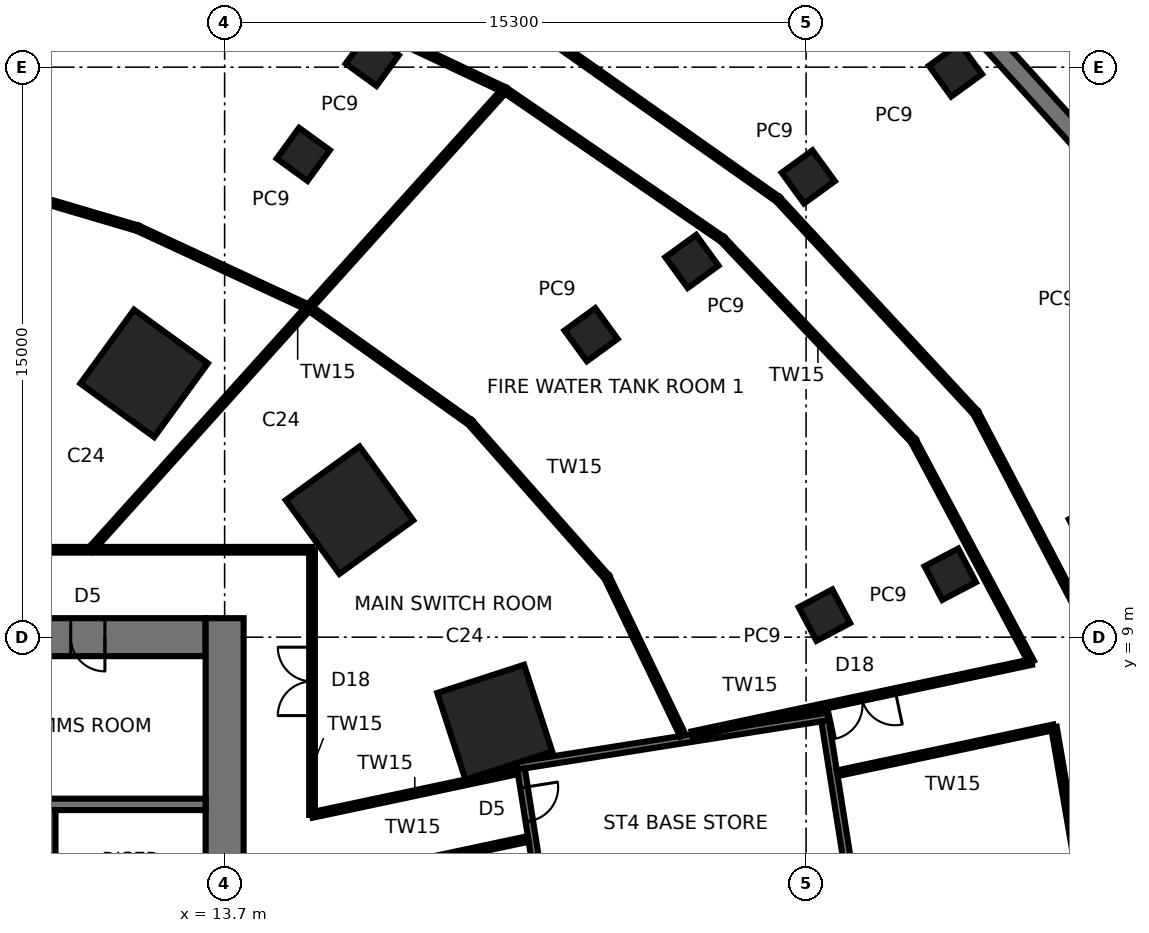
"""IFC4 building model, lengths in metres.
Left out: names, types, materials, properties, quantities, classifications, styles, units other than length and angle.
Written with IfcOpenShell. Run it as: python <this file> out.ifc"""

import sys

from ifc_helpers import new_model, si_unit, direction, frame, frame_2d, origin, origin_2d, place, context, subcontext, project, spatial, rectangle, extrude, element, fill, save


model = new_model("IFC4")
c1 = context("Model", 3, precision=1e-05, world=origin(), true_north=direction((0.0, 1.0)))
c2 = subcontext(c1, "Body", "Model", "MODEL_VIEW")
j1 = project(units=[si_unit("LENGTHUNIT", "METRE"), si_unit("PLANEANGLEUNIT", "RADIAN")], contexts=[c1])
p1 = place(None, origin())
s1 = spatial("IfcSite", under=j1, at=p1, CompositionType="ELEMENT")
p2 = place(p1, origin())
s2 = spatial("IfcBuilding", under=s1, at=p2, CompositionType="ELEMENT")
p3 = place(p2, frame((0.0, 0.0, -5.0)))
s3 = spatial("IfcBuildingStorey", under=s2, at=p3, CompositionType="ELEMENT", Elevation=-5.0)
p4 = place(p3, frame((40.052, 17.832, -0.15), z_axis=(0.0, 0.0, 1.0), x_axis=(-0.670913323969, 0.741535779124, 0.0)))
e1 = element("IfcWall", 1, at=p4, inside=s3, PredefinedType="SOLIDWALL", context=c2, shape_type="SweptSolid", body=[
    extrude(rectangle(XDim=9.168, YDim=0.5, at=frame_2d((4.584, 0.0))), origin(), (0.0, 0.0, 1.0), 4.95),
])
for number, where, z_axis, x_axis in (
    (2, (20.808, 6.761, -0.15), (0.0, 0.0, 1.0), (0.951, 0.309, 0.0)),
    (3, (16.986, 12.341, -0.15), (0.0, 0.0, 1.0), (0.809, 0.588, 0.0)),
    (4, (11.581, 15.94, -0.15), (0.0, 0.0, 1.0), (0.588, 0.809, 0.0)),
):
    element("IfcColumn", number, at=place(p3, frame(where, z_axis=z_axis, x_axis=x_axis)), inside=s3, PredefinedType="COLUMN", context=c2, shape_type="SweptSolid", body=[
        extrude(rectangle(XDim=2.4, YDim=2.4, at=origin_2d()), origin(), (0.0, 0.0, 1.0), 5.15),
    ])
for number, where, z_axis, x_axis in (
    (5, (32.93, 23.925, -0.15), (0.0, 0.0, 1.0), (0.809, 0.588, 0.0)),
    (6, (36.589, 11.888, -0.15), (0.0, 0.0, 1.0), (0.887, 0.461, 0.0)),
    (7, (29.057, 21.111, -0.15), (0.0, 0.0, 1.0), (0.809, 0.588, 0.0)),
    (8, (32.794, 10.655, -0.15), (0.0, 0.0, 1.0), (0.885, 0.465, 0.0)),
    (9, (25.997, 18.888, -0.15), (0.0, 0.0, 1.0), (0.809, 0.588, 0.0)),
    (10, (17.585, 24.204, -0.15), (0.0, 0.0, 1.0), (0.588, 0.809, 0.0)),
    (11, (29.482, 9.579, -0.15), (0.0, 0.0, 1.0), (0.884, 0.467, 0.0)),
    (12, (23.342, 16.959, -0.15), (0.0, 0.0, 1.0), (0.809, 0.588, 0.0)),
    (13, (15.77, 21.705, -0.15), (0.0, 0.0, 1.0), (0.588, 0.809, 0.0)),
):
    element("IfcColumn", number, at=place(p3, frame(where, z_axis=z_axis, x_axis=x_axis)), inside=s3, PredefinedType="COLUMN", context=c2, shape_type="SweptSolid", body=[
        extrude(rectangle(XDim=1.0, YDim=1.0, at=origin_2d()), origin(), (0.0, 0.0, 1.0), 5.15),
    ])
p5 = place(p3, frame((13.2, 9.0, -0.15), z_axis=(0.0, 0.0, 1.0), x_axis=(-1.0, 0.0, 0.0)))
e14 = element("IfcWall", 14, at=p5, inside=s3, PredefinedType="SHEAR", context=c2, shape_type="SweptSolid", body=[
    extrude(rectangle(XDim=26.4, YDim=1.0, at=frame_2d((13.2, 0.0))), origin(), (0.0, 0.0, 1.0), 5.15),
])
p6 = place(p5, frame((2.65, 0.0, 0.15)))
e15 = element("IfcOpeningElement", 15, at=p6, cuts=e14, PredefinedType="OPENING", context=c2, shape_type="SweptSolid", body=[
    extrude(rectangle(XDim=0.9, YDim=2.1, at=frame_2d((0.45, 1.05))), frame((0.0, 0.51, 0.0), z_axis=(0.0, -1.0, 0.0), x_axis=(1.0, 0.0, 0.0)), (0.0, 0.0, 1.0), 1.02),
])
p7 = place(p5, frame((9.5, 0.0, 0.15)))
e16 = element("IfcOpeningElement", 16, at=p7, cuts=e14, PredefinedType="OPENING", context=c2, shape_type="SweptSolid", body=[
    extrude(rectangle(XDim=0.9, YDim=2.1, at=frame_2d((0.45, 1.05))), frame((0.0, 0.51, 0.0), z_axis=(0.0, -1.0, 0.0), x_axis=(1.0, 0.0, 0.0)), (0.0, 0.0, 1.0), 1.02),
])
p8 = place(p5, frame((16.0, 0.0, 0.15)))
e17 = element("IfcOpeningElement", 17, at=p8, cuts=e14, PredefinedType="OPENING", context=c2, shape_type="SweptSolid", body=[
    extrude(rectangle(XDim=0.9, YDim=2.1, at=frame_2d((0.45, 1.05))), frame((0.0, 0.51, 0.0), z_axis=(0.0, -1.0, 0.0), x_axis=(1.0, 0.0, 0.0)), (0.0, 0.0, 1.0), 1.02),
])
p9 = place(p5, frame((21.25, 0.0, 0.15)))
e18 = element("IfcOpeningElement", 18, at=p9, cuts=e14, PredefinedType="OPENING", context=c2, shape_type="SweptSolid", body=[
    extrude(rectangle(XDim=0.9, YDim=2.1, at=frame_2d((0.45, 1.05))), frame((0.0, 0.51, 0.0), z_axis=(0.0, -1.0, 0.0), x_axis=(1.0, 0.0, 0.0)), (0.0, 0.0, 1.0), 1.02),
])
p10 = place(p5, frame((24.8, 0.0, 0.15)))
e19 = element("IfcOpeningElement", 19, at=p10, cuts=e14, PredefinedType="OPENING", context=c2, shape_type="SweptSolid", body=[
    extrude(rectangle(XDim=1.0, YDim=2.1, at=frame_2d((0.5, 1.05))), frame((0.0, 0.51, 0.0), z_axis=(0.0, -1.0, 0.0), x_axis=(1.0, 0.0, 0.0)), (0.0, 0.0, 1.0), 1.02),
])
p11 = place(p3, frame((13.7, -9.5, -0.15), z_axis=(0.0, 0.0, 1.0), x_axis=(0.0, 1.0, 0.0)))
e20 = element("IfcWall", 20, at=p11, inside=s3, PredefinedType="SHEAR", context=c2, shape_type="SweptSolid", body=[
    extrude(rectangle(XDim=19.0, YDim=1.0, at=frame_2d((9.5, 0.0))), origin(), (0.0, 0.0, 1.0), 5.15),
])
p12 = place(p11, frame((8.6, 0.0, 0.15)))
e21 = element("IfcOpeningElement", 21, at=p12, cuts=e20, PredefinedType="OPENING", context=c2, shape_type="SweptSolid", body=[
    extrude(rectangle(XDim=1.8, YDim=2.4, at=frame_2d((0.9, 1.2))), frame((0.0, 0.51, 0.0), z_axis=(0.0, -1.0, 0.0), x_axis=(1.0, 0.0, 0.0)), (0.0, 0.0, 1.0), 1.02),
])
p13 = place(p3, frame((-13.2, 4.6, -0.15), z_axis=(0.0, 0.0, 1.0), x_axis=(1.0, 0.0, 0.0)))
e22 = element("IfcWall", 22, at=p13, inside=s3, PredefinedType="SHEAR", context=c2, shape_type="SweptSolid", body=[
    extrude(rectangle(XDim=26.4, YDim=0.3, at=frame_2d((13.2, 0.0))), origin(), (0.0, 0.0, 1.0), 5.15),
])
p14 = place(p3, frame((9.1, 1.75, -0.15), z_axis=(0.0, 0.0, 1.0), x_axis=(0.0, 1.0, 0.0)))
e23 = element("IfcWall", 23, at=p14, inside=s3, PredefinedType="SHEAR", context=c2, shape_type="SweptSolid", body=[
    extrude(rectangle(XDim=2.7, YDim=0.3, at=frame_2d((1.35, 0.0))), origin(), (0.0, 0.0, 1.0), 5.15),
])
p15 = place(p3, frame((21.385, 5.615, 0.0), z_axis=(0.0, 0.0, 1.0), x_axis=(0.987689398324, 0.156427786655, 0.0)))
e24 = element("IfcWall", 24, at=p15, inside=s3, PredefinedType="SOLIDWALL", context=c2, shape_type="SweptSolid", body=[
    extrude(rectangle(XDim=8.3, YDim=0.2, at=frame_2d((4.15, 0.0))), origin(), (0.0, 0.0, 1.0), 4.8),
])
p16 = place(p3, frame((22.156, 1.383, 0.0), z_axis=(0.0, 0.0, 1.0), x_axis=(-0.156428225752, 0.987689328781, 0.0)))
e25 = element("IfcWall", 25, at=p16, inside=s3, PredefinedType="SOLIDWALL", context=c2, shape_type="SweptSolid", body=[
    extrude(rectangle(XDim=4.2, YDim=0.2, at=frame_2d((2.1, 0.0))), origin(), (0.0, 0.0, 1.0), 4.8),
])
p17 = place(p16, frame((2.81, 0.0, 0.0)))
e26 = element("IfcOpeningElement", 26, at=p17, cuts=e25, PredefinedType="OPENING", context=c2, shape_type="SweptSolid", body=[
    extrude(rectangle(XDim=0.9, YDim=2.1, at=frame_2d((0.45, 1.05))), frame((0.0, 0.11, 0.0), z_axis=(0.0, -1.0, 0.0), x_axis=(1.0, 0.0, 0.0)), (0.0, 0.0, 1.0), 0.22),
])
p18 = place(p3, frame((30.157, 2.65, 0.0), z_axis=(0.0, 0.0, 1.0), x_axis=(-0.156419245009, 0.987690751091, 0.0)))
e27 = element("IfcWall", 27, at=p18, inside=s3, PredefinedType="SOLIDWALL", context=c2, shape_type="SweptSolid", body=[
    extrude(rectangle(XDim=4.2, YDim=0.2, at=frame_2d((2.1, 0.0))), origin(), (0.0, 0.0, 1.0), 4.8),
])
p19 = place(p3, frame((35.521, 6.63, 0.0), z_axis=(0.0, 0.0, 1.0), x_axis=(0.16926398277, -0.985570750447, 0.0)))
e28 = element("IfcWall", 28, at=p19, inside=s3, PredefinedType="PARTITIONING", context=c2, shape_type="SweptSolid", body=[
    extrude(rectangle(XDim=6.727, YDim=0.15, at=frame_2d((3.364, 0.0))), origin(), (0.0, 0.0, 1.0), 4.8),
])
p20 = place(p3, frame((16.0, 2.481, 0.0), z_axis=(0.0, 0.0, 1.0), x_axis=(0.978144448143, 0.207926522038, 0.0)))
e29 = element("IfcWall", 29, at=p20, inside=s3, PredefinedType="PARTITIONING", context=c2, shape_type="SweptSolid", body=[
    extrude(rectangle(XDim=5.817, YDim=0.15, at=frame_2d((2.908, 0.0))), origin(), (0.0, 0.0, 1.0), 4.8),
])
p21 = place(p3, frame((29.82, 5.418, 0.0), z_axis=(0.0, 0.0, 1.0), x_axis=(0.97814799205, 0.207909849813, 0.0)))
e30 = element("IfcWall", 30, at=p21, inside=s3, PredefinedType="PARTITIONING", context=c2, shape_type="SweptSolid", body=[
    extrude(rectangle(XDim=5.829, YDim=0.15, at=frame_2d((2.915, 0.0))), origin(), (0.0, 0.0, 1.0), 4.8),
])
p22 = place(p3, frame((34.928, 8.344, 0.0), z_axis=(0.0, 0.0, 1.0), x_axis=(-0.978145998804, -0.207919227161, 0.0)))
e31 = element("IfcWall", 31, at=p22, inside=s3, PredefinedType="PARTITIONING", context=c2, shape_type="SweptSolid", body=[
    extrude(rectangle(XDim=9.126, YDim=0.15, at=frame_2d((4.563, 0.0))), origin(), (0.0, 0.0, 1.0), 4.8),
])
p23 = place(p22, frame((3.663, 0.0, 0.0)))
e32 = element("IfcOpeningElement", 32, at=p23, cuts=e31, PredefinedType="OPENING", context=c2, shape_type="SweptSolid", body=[
    extrude(rectangle(XDim=1.8, YDim=2.4, at=frame_2d((0.9, 1.2))), frame((0.0, 0.085, 0.0), z_axis=(0.0, -1.0, 0.0), x_axis=(1.0, 0.0, 0.0)), (0.0, 0.0, 1.0), 0.17),
])
p24 = place(p3, frame((21.408, 5.47, 0.0), z_axis=(0.0, 0.0, 1.0), x_axis=(-0.978148748832, -0.207906289368, 0.0)))
e33 = element("IfcWall", 33, at=p24, inside=s3, PredefinedType="PARTITIONING", context=c2, shape_type="SweptSolid", body=[
    extrude(rectangle(XDim=5.529, YDim=0.15, at=frame_2d((2.764, 0.0))), origin(), (0.0, 0.0, 1.0), 4.8),
])
p25 = place(p3, frame((37.129, 7.892, 0.0), z_axis=(0.0, 0.0, 1.0), x_axis=(-0.462902565911, 0.886409168766, 0.0)))
e34 = element("IfcWall", 34, at=p25, inside=s3, PredefinedType="PARTITIONING", context=c2, shape_type="SweptSolid", body=[
    extrude(rectangle(XDim=7.907, YDim=0.15, at=frame_2d((3.954, 0.0))), origin(), (0.0, 0.0, 1.0), 4.8),
])
p26 = place(p3, frame((31.825, 14.169, 0.0), z_axis=(0.0, 0.0, 1.0), x_axis=(0.470234923121, -0.882541283497, 0.0)))
e35 = element("IfcWall", 35, at=p26, inside=s3, PredefinedType="PARTITIONING", context=c2, shape_type="SweptSolid", body=[
    extrude(rectangle(XDim=6.6, YDim=0.15, at=frame_2d((3.3, 0.0))), origin(), (0.0, 0.0, 1.0), 4.8),
])
p27 = place(p3, frame((23.76, 10.579, 0.0), z_axis=(0.0, 0.0, 1.0), x_axis=(0.432478788048, -0.90164410822, 0.0)))
e36 = element("IfcWall", 36, at=p27, inside=s3, PredefinedType="PARTITIONING", context=c2, shape_type="SweptSolid", body=[
    extrude(rectangle(XDim=4.625, YDim=0.15, at=frame_2d((2.312, 0.0))), origin(), (0.0, 0.0, 1.0), 4.8),
])
p28 = place(p3, frame((16.0, 4.321, 0.0), z_axis=(0.0, 0.0, 1.0), x_axis=(0.0, 1.0, 0.0)))
e37 = element("IfcWall", 37, at=p28, inside=s3, PredefinedType="PARTITIONING", context=c2, shape_type="SweptSolid", body=[
    extrude(rectangle(XDim=6.979, YDim=0.15, at=frame_2d((3.49, 0.0))), origin(), (0.0, 0.0, 1.0), 4.8),
])
p29 = place(p28, frame((2.615, 0.0, 0.0)))
e38 = element("IfcOpeningElement", 38, at=p29, cuts=e37, PredefinedType="OPENING", context=c2, shape_type="SweptSolid", body=[
    extrude(rectangle(XDim=1.8, YDim=2.4, at=frame_2d((0.9, 1.2))), frame((0.0, 0.085, 0.0), z_axis=(0.0, -1.0, 0.0), x_axis=(1.0, 0.0, 0.0)), (0.0, 0.0, 1.0), 0.17),
])
p30 = place(p3, frame((26.799, 19.47, 0.0), z_axis=(0.0, 0.0, 1.0), x_axis=(0.688006019466, -0.725704979436, 0.0)))
e39 = element("IfcWall", 39, at=p30, inside=s3, PredefinedType="PARTITIONING", context=c2, shape_type="SweptSolid", body=[
    extrude(rectangle(XDim=7.305, YDim=0.15, at=frame_2d((3.652, 0.0))), origin(), (0.0, 0.0, 1.0), 4.8),
])
p31 = place(p3, frame((33.469, 14.901, 0.0), z_axis=(0.0, 0.0, 1.0), x_axis=(-0.679653590843, 0.733533227914, 0.0)))
e40 = element("IfcWall", 40, at=p31, inside=s3, PredefinedType="PARTITIONING", context=c2, shape_type="SweptSolid", body=[
    extrude(rectangle(XDim=7.671, YDim=0.15, at=frame_2d((3.836, 0.0))), origin(), (0.0, 0.0, 1.0), 4.8),
])
p32 = place(p3, frame((20.164, 14.65, 0.0), z_axis=(0.0, 0.0, 1.0), x_axis=(0.661972392396, -0.749528219419, 0.0)))
e41 = element("IfcWall", 41, at=p32, inside=s3, PredefinedType="PARTITIONING", context=c2, shape_type="SweptSolid", body=[
    extrude(rectangle(XDim=5.432, YDim=0.15, at=frame_2d((2.716, 0.0))), origin(), (0.0, 0.0, 1.0), 4.8),
])
p33 = place(p3, frame((21.07, 23.401, 0.0), z_axis=(0.0, 0.0, 1.0), x_axis=(0.824602390989, -0.565712733439, 0.0)))
e42 = element("IfcWall", 42, at=p33, inside=s3, PredefinedType="PARTITIONING", context=c2, shape_type="SweptSolid", body=[
    extrude(rectangle(XDim=6.947, YDim=0.15, at=frame_2d((3.474, 0.0))), origin(), (0.0, 0.0, 1.0), 4.8),
])
p34 = place(p3, frame((28.255, 20.529, 0.0), z_axis=(0.0, 0.0, 1.0), x_axis=(-0.817737752459, 0.575590973003, 0.0)))
e43 = element("IfcWall", 43, at=p34, inside=s3, PredefinedType="PARTITIONING", context=c2, shape_type="SweptSolid", body=[
    extrude(rectangle(XDim=7.314, YDim=0.15, at=frame_2d((3.657, 0.0))), origin(), (0.0, 0.0, 1.0), 4.8),
])
p35 = place(p3, frame((15.913, 17.673, 0.0), z_axis=(0.0, 0.0, 1.0), x_axis=(0.81494599189, -0.579536910215, 0.0)))
e44 = element("IfcWall", 44, at=p35, inside=s3, PredefinedType="PARTITIONING", context=c2, shape_type="SweptSolid", body=[
    extrude(rectangle(XDim=5.217, YDim=0.15, at=frame_2d((2.608, 0.0))), origin(), (0.0, 0.0, 1.0), 4.8),
])
p36 = place(p3, frame((10.175, 11.3, 0.0), z_axis=(0.0, 0.0, 1.0), x_axis=(0.669133702803, 0.743142037415, 0.0)))
e45 = element("IfcWall", 45, at=p36, inside=s3, PredefinedType="PARTITIONING", context=c2, shape_type="SweptSolid", body=[
    extrude(rectangle(XDim=16.283, YDim=0.15, at=frame_2d((8.142, 0.0))), origin(), (0.0, 0.0, 1.0), 4.8),
])
p37 = place(p3, frame((11.41, 19.762, 0.0), z_axis=(0.0, 0.0, 1.0), x_axis=(0.907108234971, -0.420897434119, 0.0)))
e46 = element("IfcWall", 46, at=p37, inside=s3, PredefinedType="PARTITIONING", context=c2, shape_type="SweptSolid", body=[
    extrude(rectangle(XDim=4.964, YDim=0.15, at=frame_2d((2.482, 0.0))), origin(), (0.0, 0.0, 1.0), 4.8),
])
p38 = place(p3, frame((15.13, 26.206, 0.0), z_axis=(0.0, 0.0, 1.0), x_axis=(0.90422911436, -0.427047665657, 0.0)))
e47 = element("IfcWall", 47, at=p38, inside=s3, PredefinedType="PARTITIONING", context=c2, shape_type="SweptSolid", body=[
    extrude(rectangle(XDim=6.569, YDim=0.15, at=frame_2d((3.285, 0.0))), origin(), (0.0, 0.0, 1.0), 4.8),
])
p39 = place(p3, frame((16.0, 11.3, 0.0), z_axis=(0.0, 0.0, 1.0), x_axis=(-1.0, 0.0, 0.0)))
e48 = element("IfcWall", 48, at=p39, inside=s3, PredefinedType="PARTITIONING", context=c2, shape_type="SweptSolid", body=[
    extrude(rectangle(XDim=16.283, YDim=0.15, at=frame_2d((8.141, 0.0))), origin(), (0.0, 0.0, 1.0), 4.8),
])
p40 = place(p3, frame((6.858, 21.106, 0.0), z_axis=(0.0, 0.0, 1.0), x_axis=(0.959084076189, -0.283121413534, 0.0)))
e49 = element("IfcWall", 49, at=p40, inside=s3, PredefinedType="PARTITIONING", context=c2, shape_type="SweptSolid", body=[
    extrude(rectangle(XDim=4.746, YDim=0.15, at=frame_2d((2.373, 0.0))), origin(), (0.0, 0.0, 1.0), 4.8),
])
p41 = place(p6, origin())
e50 = element("IfcDoor", 50, at=p41, inside=s3, OperationType="SINGLE_SWING_LEFT", PredefinedType="DOOR", context=c2, shape_type="SweptSolid", body=[
    extrude(rectangle(XDim=0.82, YDim=2.06, at=frame_2d((0.45, 1.03))), frame((0.0, 0.025, 0.0), z_axis=(0.0, -1.0, 0.0), x_axis=(1.0, 0.0, 0.0)), (0.0, 0.0, 1.0), 0.05),
    extrude(rectangle(XDim=0.04, YDim=2.1, at=frame_2d((0.02, 1.05))), frame((0.0, 0.25, 0.0), z_axis=(0.0, -1.0, 0.0), x_axis=(1.0, 0.0, 0.0)), (0.0, 0.0, 1.0), 0.5),
    extrude(rectangle(XDim=0.04, YDim=2.1, at=frame_2d((0.88, 1.05))), frame((0.0, 0.25, 0.0), z_axis=(0.0, -1.0, 0.0), x_axis=(1.0, 0.0, 0.0)), (0.0, 0.0, 1.0), 0.5),
    extrude(rectangle(XDim=0.82, YDim=0.04, at=frame_2d((0.45, 2.08))), frame((0.0, 0.25, 0.0), z_axis=(0.0, -1.0, 0.0), x_axis=(1.0, 0.0, 0.0)), (0.0, 0.0, 1.0), 0.5),
])
fill(e15, e50)
p42 = place(p29, origin())
e51 = element("IfcDoor", 51, at=p42, inside=s3, OperationType="DOUBLE_DOOR_SINGLE_SWING", PredefinedType="DOOR", context=c2, shape_type="SweptSolid", body=[
    extrude(rectangle(XDim=1.8, YDim=2.4, at=frame_2d((0.9, 1.2))), frame((0.0, 0.025, 0.0), z_axis=(0.0, -1.0, 0.0), x_axis=(1.0, 0.0, 0.0)), (0.0, 0.0, 1.0), 0.05),
])
fill(e38, e51)
p43 = place(p23, origin())
e52 = element("IfcDoor", 52, at=p43, inside=s3, OperationType="DOUBLE_DOOR_SINGLE_SWING", PredefinedType="DOOR", context=c2, shape_type="SweptSolid", body=[
    extrude(rectangle(XDim=1.8, YDim=2.4, at=frame_2d((0.9, 1.2))), frame((0.0, 0.025, 0.0), z_axis=(0.0, -1.0, 0.0), x_axis=(1.0, 0.0, 0.0)), (0.0, 0.0, 1.0), 0.05),
])
fill(e32, e52)
p44 = place(p17, frame((0.9, 0.0, 0.0), z_axis=(0.0, 0.0, 1.0), x_axis=(-1.0, 0.0, 0.0)))
e53 = element("IfcDoor", 53, at=p44, inside=s3, OperationType="SINGLE_SWING_LEFT", PredefinedType="DOOR", context=c2, shape_type="SweptSolid", body=[
    extrude(rectangle(XDim=0.9, YDim=2.1, at=frame_2d((0.45, 1.05))), frame((0.0, 0.025, 0.0), z_axis=(0.0, -1.0, 0.0), x_axis=(1.0, 0.0, 0.0)), (0.0, 0.0, 1.0), 0.05),
])
fill(e26, e53)
save(model, sys.argv[1])
